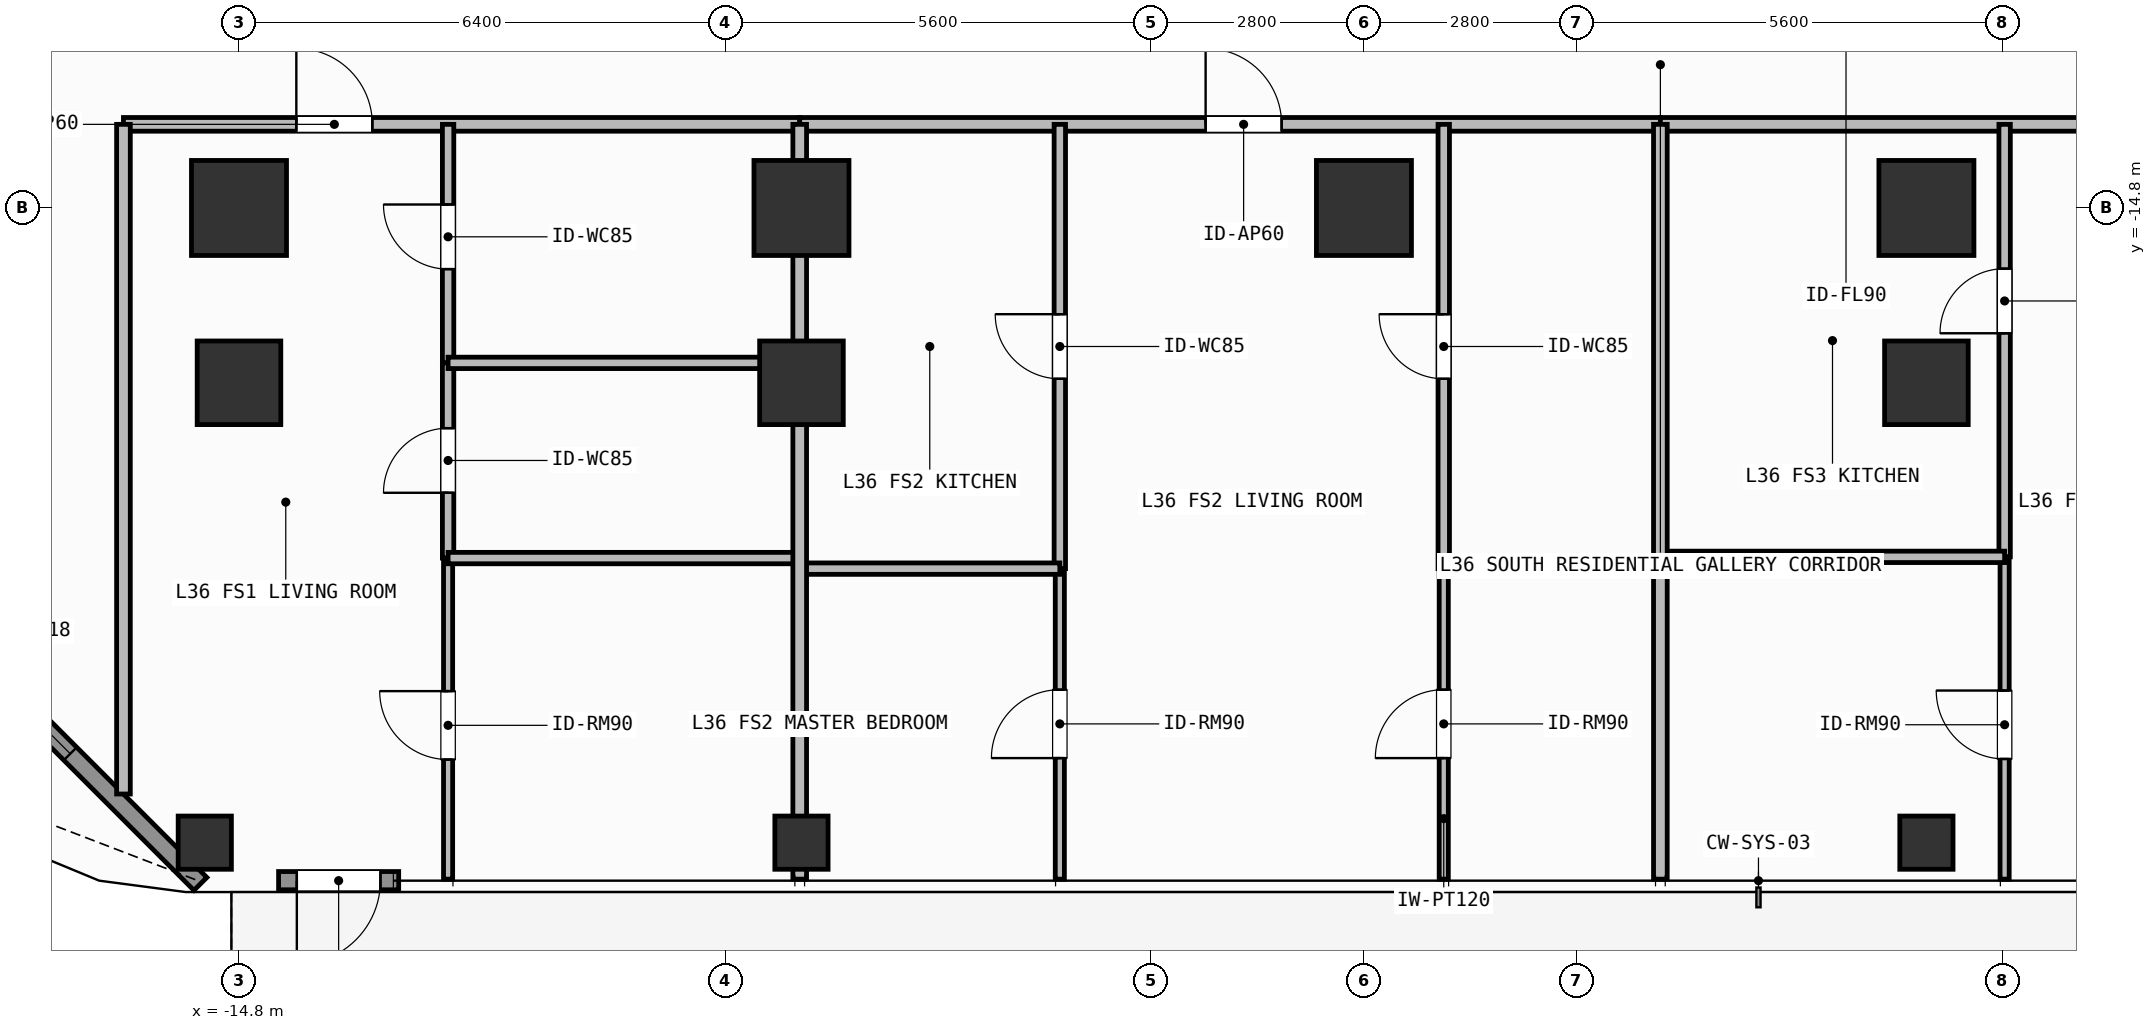
"""IFC4 building model, lengths in metres.
Left out: names, types, materials, properties, quantities, classifications, styles, units other than length and angle.
Written with IfcOpenShell. Run it as: python <this file> out.ifc"""

import sys

from ifc_helpers import new_model, si_unit, direction, frame, frame_2d, origin, origin_2d, place, context, subcontext, project, spatial, rectangle, hollow_rectangle, extrude, element, fill, save


model = new_model("IFC4")
c1 = context("Model", 3, precision=1e-05, world=origin(), true_north=direction((0.0, 1.0)))
c2 = subcontext(c1, "Body", "Model", "MODEL_VIEW")
j1 = project(units=[si_unit("LENGTHUNIT", "METRE"), si_unit("PLANEANGLEUNIT", "RADIAN")], contexts=[c1])
p1 = place(None, origin())
s1 = spatial("IfcSite", under=j1, at=p1, CompositionType="ELEMENT")
p2 = place(p1, origin())
s2 = spatial("IfcBuilding", under=s1, at=p2, CompositionType="ELEMENT")
p3 = place(p2, frame((0.0, 0.0, 144.6)))
s3 = spatial("IfcBuildingStorey", under=s2, at=p3, CompositionType="ELEMENT", Elevation=144.6)
for number, where, z_axis, x_axis in (
    (1, (-14.8, -14.8, 0.0), (0.0, 0.0, 1.0), (1.0, 0.0, 0.0)),
    (2, (-7.4, -14.8, 0.0), (0.0, 0.0, 1.0), (1.0, 0.0, 0.0)),
    (3, (0.0, -14.8, 0.0), (0.0, 0.0, 1.0), (1.0, 0.0, 0.0)),
    (4, (7.4, -14.8, 0.0), (0.0, 0.0, 1.0), (1.0, 0.0, 0.0)),
):
    element("IfcColumn", number, at=place(p3, frame(where, z_axis=z_axis, x_axis=x_axis)), inside=s3, PredefinedType="COLUMN", context=c2, shape_type="SweptSolid", body=[
        extrude(rectangle(XDim=1.25, YDim=1.25, at=origin_2d()), origin(), (0.0, 0.0, 1.0), 3.9),
    ])
for number, where, z_axis, x_axis in (
    (5, (-14.8, -17.1, 0.0), (0.0, 0.0, 1.0), (1.0, 0.0, 0.0)),
    (6, (-7.4, -17.1, 0.0), (0.0, 0.0, 1.0), (1.0, 0.0, 0.0)),
    (7, (7.4, -17.1, 0.0), (0.0, 0.0, 1.0), (1.0, 0.0, 0.0)),
):
    element("IfcColumn", number, at=place(p3, frame(where, z_axis=z_axis, x_axis=x_axis)), inside=s3, PredefinedType="COLUMN", context=c2, shape_type="SweptSolid", body=[
        extrude(rectangle(XDim=1.1, YDim=1.1, at=origin_2d()), origin(), (0.0, 0.0, 1.0), 3.9),
    ])
for number, where, z_axis, x_axis in (
    (8, (-15.25, -23.15, 0.0), (0.0, 0.0, 1.0), (1.0, 0.0, 0.0)),
    (9, (-7.4, -23.15, 0.0), (0.0, 0.0, 1.0), (1.0, 0.0, 0.0)),
    (10, (7.4, -23.15, 0.0), (0.0, 0.0, 1.0), (1.0, 0.0, 0.0)),
):
    element("IfcColumn", number, at=place(p3, frame(where, z_axis=z_axis, x_axis=x_axis)), inside=s3, PredefinedType="COLUMN", context=c2, shape_type="SweptSolid", body=[
        extrude(hollow_rectangle(XDim=0.7, YDim=0.7, WallThickness=0.032, at=origin_2d()), origin(), (0.0, 0.0, 1.0), 3.9),
    ])
p4 = place(p3, frame((-12.699, -23.65, 0.0), z_axis=(0.0, 0.0, 1.0), x_axis=(-1.0, 0.0, 0.0)))
e11 = element("IfcWall", 11, at=p4, inside=s3, PredefinedType="SOLIDWALL", context=c2, shape_type="SweptSolid", body=[
    extrude(rectangle(XDim=1.58, YDim=0.24, at=frame_2d((0.79, 0.0))), origin(), (0.0, 0.0, 1.0), 3.68),
])
p5 = place(p4, frame((0.24, 0.0, 0.0)))
e12 = element("IfcOpeningElement", 12, at=p5, cuts=e11, PredefinedType="OPENING", context=c2, shape_type="SweptSolid", body=[
    extrude(rectangle(XDim=1.1, YDim=2.2, at=frame_2d((0.55, 1.1))), frame((0.0, 0.13, 0.0), z_axis=(0.0, -1.0, 0.0), x_axis=(1.0, 0.0, 0.0)), (0.0, 0.0, 1.0), 0.26),
])
p6 = place(p3, frame((-15.308, -23.692, 0.0), z_axis=(0.0, 0.0, 1.0), x_axis=(-0.707106781187, 0.707106781187, 0.0)))
e13 = element("IfcWall", 13, at=p6, inside=s3, PredefinedType="SOLIDWALL", context=c2, shape_type="SweptSolid", body=[
    extrude(rectangle(XDim=6.343, YDim=0.24, at=frame_2d((3.171, 0.0))), origin(), (0.0, 0.0, 1.0), 3.68),
])
p7 = place(p6, frame((2.421, 0.0, 0.8)))
e14 = element("IfcOpeningElement", 14, at=p7, cuts=e13, PredefinedType="OPENING", context=c2, shape_type="SweptSolid", body=[
    extrude(rectangle(XDim=1.5, YDim=1.85, at=frame_2d((0.75, 0.925))), frame((0.0, 0.13, 0.0), z_axis=(0.0, -1.0, 0.0), x_axis=(1.0, 0.0, 0.0)), (0.0, 0.0, 1.0), 0.26),
])
p8 = place(p3, frame((-16.32, -13.7, 0.0), z_axis=(0.0, 0.0, 1.0), x_axis=(1.0, 0.0, 0.0)))
e15 = element("IfcWall", 15, at=p8, inside=s3, PredefinedType="PARTITIONING", context=c2, shape_type="SweptSolid", body=[
    extrude(rectangle(XDim=8.897, YDim=0.18, at=frame_2d((4.448, 0.0))), origin(), (0.0, 0.0, 1.0), 3.68),
])
p9 = place(p8, frame((2.274, 0.0, 0.0)))
e16 = element("IfcOpeningElement", 16, at=p9, cuts=e15, PredefinedType="OPENING", context=c2, shape_type="SweptSolid", body=[
    extrude(rectangle(XDim=1.0, YDim=2.2, at=frame_2d((0.5, 1.1))), frame((0.0, 0.1, 0.0), z_axis=(0.0, -1.0, 0.0), x_axis=(1.0, 0.0, 0.0)), (0.0, 0.0, 1.0), 0.2),
])
p10 = place(p3, frame((-12.049, -16.838, 0.0), z_axis=(0.0, 0.0, 1.0), x_axis=(0.0, 1.0, 0.0)))
e17 = element("IfcWall", 17, at=p10, inside=s3, PredefinedType="PARTITIONING", context=c2, shape_type="SweptSolid", body=[
    extrude(rectangle(XDim=3.138, YDim=0.15, at=frame_2d((1.569, 0.0))), origin(), (0.0, 0.0, 1.0), 3.68),
])
p11 = place(p10, frame((1.233, 0.0, 0.0)))
e18 = element("IfcOpeningElement", 18, at=p11, cuts=e17, PredefinedType="OPENING", context=c2, shape_type="SweptSolid", body=[
    extrude(rectangle(XDim=0.85, YDim=2.1, at=frame_2d((0.425, 1.05))), frame((0.0, 0.085, 0.0), z_axis=(0.0, -1.0, 0.0), x_axis=(1.0, 0.0, 0.0)), (0.0, 0.0, 1.0), 0.17),
])
p12 = place(p3, frame((-12.049, -19.406, 0.0), z_axis=(0.0, 0.0, 1.0), x_axis=(0.0, 1.0, 0.0)))
e19 = element("IfcWall", 19, at=p12, inside=s3, PredefinedType="PARTITIONING", context=c2, shape_type="SweptSolid", body=[
    extrude(rectangle(XDim=2.568, YDim=0.15, at=frame_2d((1.284, 0.0))), origin(), (0.0, 0.0, 1.0), 3.68),
])
p13 = place(p12, frame((0.859, 0.0, 0.0)))
e20 = element("IfcOpeningElement", 20, at=p13, cuts=e19, PredefinedType="OPENING", context=c2, shape_type="SweptSolid", body=[
    extrude(rectangle(XDim=0.85, YDim=2.1, at=frame_2d((0.425, 1.05))), frame((0.0, 0.085, 0.0), z_axis=(0.0, -1.0, 0.0), x_axis=(1.0, 0.0, 0.0)), (0.0, 0.0, 1.0), 0.17),
])
p14 = place(p3, frame((-12.049, -23.63, 0.0), z_axis=(0.0, 0.0, 1.0), x_axis=(0.0, 1.0, 0.0)))
e21 = element("IfcWall", 21, at=p14, inside=s3, PredefinedType="PARTITIONING", context=c2, shape_type="SweptSolid", body=[
    extrude(rectangle(XDim=4.224, YDim=0.12, at=frame_2d((2.112, 0.0))), origin(), (0.0, 0.0, 1.0), 3.68),
])
p15 = place(p14, frame((1.573, 0.0, 0.0)))
e22 = element("IfcOpeningElement", 22, at=p15, cuts=e21, PredefinedType="OPENING", context=c2, shape_type="SweptSolid", body=[
    extrude(rectangle(XDim=0.9, YDim=2.1, at=frame_2d((0.45, 1.05))), frame((0.0, 0.07, 0.0), z_axis=(0.0, -1.0, 0.0), x_axis=(1.0, 0.0, 0.0)), (0.0, 0.0, 1.0), 0.14),
])
p16 = place(p3, frame((-7.423, -13.7, 0.0), z_axis=(0.0, 0.0, 1.0), x_axis=(1.0, 0.0, 0.0)))
e23 = element("IfcWall", 23, at=p16, inside=s3, PredefinedType="PARTITIONING", context=c2, shape_type="SweptSolid", body=[
    extrude(rectangle(XDim=11.323, YDim=0.18, at=frame_2d((5.662, 0.0))), origin(), (0.0, 0.0, 1.0), 3.68),
])
p17 = place(p16, frame((5.34, 0.0, 0.0)))
e24 = element("IfcOpeningElement", 24, at=p17, cuts=e23, PredefinedType="OPENING", context=c2, shape_type="SweptSolid", body=[
    extrude(rectangle(XDim=1.0, YDim=2.2, at=frame_2d((0.5, 1.1))), frame((0.0, 0.1, 0.0), z_axis=(0.0, -1.0, 0.0), x_axis=(1.0, 0.0, 0.0)), (0.0, 0.0, 1.0), 0.2),
])
p18 = place(p3, frame((-4.001, -19.545, 0.0), z_axis=(0.0, 0.0, 1.0), x_axis=(0.0, 1.0, 0.0)))
e25 = element("IfcWall", 25, at=p18, inside=s3, PredefinedType="PARTITIONING", context=c2, shape_type="SweptSolid", body=[
    extrude(rectangle(XDim=5.845, YDim=0.15, at=frame_2d((2.922, 0.0))), origin(), (0.0, 0.0, 1.0), 3.68),
])
p19 = place(p18, frame((2.498, 0.0, 0.0)))
e26 = element("IfcOpeningElement", 26, at=p19, cuts=e25, PredefinedType="OPENING", context=c2, shape_type="SweptSolid", body=[
    extrude(rectangle(XDim=0.85, YDim=2.1, at=frame_2d((0.425, 1.05))), frame((0.0, 0.085, 0.0), z_axis=(0.0, -1.0, 0.0), x_axis=(1.0, 0.0, 0.0)), (0.0, 0.0, 1.0), 0.17),
])
p20 = place(p3, frame((-4.001, -23.63, 0.0), z_axis=(0.0, 0.0, 1.0), x_axis=(0.0, 1.0, 0.0)))
e27 = element("IfcWall", 27, at=p20, inside=s3, PredefinedType="PARTITIONING", context=c2, shape_type="SweptSolid", body=[
    extrude(rectangle(XDim=4.085, YDim=0.12, at=frame_2d((2.042, 0.0))), origin(), (0.0, 0.0, 1.0), 3.68),
])
p21 = place(p20, frame((1.593, 0.0, 0.0)))
e28 = element("IfcOpeningElement", 28, at=p21, cuts=e27, PredefinedType="OPENING", context=c2, shape_type="SweptSolid", body=[
    extrude(rectangle(XDim=0.9, YDim=2.1, at=frame_2d((0.45, 1.05))), frame((0.0, 0.07, 0.0), z_axis=(0.0, -1.0, 0.0), x_axis=(1.0, 0.0, 0.0)), (0.0, 0.0, 1.0), 0.14),
])
p22 = place(p3, frame((1.05, -19.545, 0.0), z_axis=(0.0, 0.0, 1.0), x_axis=(0.0, 1.0, 0.0)))
e29 = element("IfcWall", 29, at=p22, inside=s3, PredefinedType="PARTITIONING", context=c2, shape_type="SweptSolid", body=[
    extrude(rectangle(XDim=5.845, YDim=0.15, at=frame_2d((2.922, 0.0))), origin(), (0.0, 0.0, 1.0), 3.68),
])
p23 = place(p22, frame((2.498, 0.0, 0.0)))
e30 = element("IfcOpeningElement", 30, at=p23, cuts=e29, PredefinedType="OPENING", context=c2, shape_type="SweptSolid", body=[
    extrude(rectangle(XDim=0.85, YDim=2.1, at=frame_2d((0.425, 1.05))), frame((0.0, 0.085, 0.0), z_axis=(0.0, -1.0, 0.0), x_axis=(1.0, 0.0, 0.0)), (0.0, 0.0, 1.0), 0.17),
])
p24 = place(p3, frame((1.05, -23.63, 0.0), z_axis=(0.0, 0.0, 1.0), x_axis=(0.0, 1.0, 0.0)))
e31 = element("IfcWall", 31, at=p24, inside=s3, PredefinedType="PARTITIONING", context=c2, shape_type="SweptSolid", body=[
    extrude(rectangle(XDim=4.085, YDim=0.12, at=frame_2d((2.042, 0.0))), origin(), (0.0, 0.0, 1.0), 3.68),
])
p25 = place(p24, frame((1.593, 0.0, 0.0)))
e32 = element("IfcOpeningElement", 32, at=p25, cuts=e31, PredefinedType="OPENING", context=c2, shape_type="SweptSolid", body=[
    extrude(rectangle(XDim=0.9, YDim=2.1, at=frame_2d((0.45, 1.05))), frame((0.0, 0.07, 0.0), z_axis=(0.0, -1.0, 0.0), x_axis=(1.0, 0.0, 0.0)), (0.0, 0.0, 1.0), 0.14),
])
p26 = place(p3, frame((3.9, -13.7, 0.0), z_axis=(0.0, 0.0, 1.0), x_axis=(1.0, 0.0, 0.0)))
e33 = element("IfcWall", 33, at=p26, inside=s3, PredefinedType="PARTITIONING", context=c2, shape_type="SweptSolid", body=[
    extrude(rectangle(XDim=11.323, YDim=0.18, at=frame_2d((5.662, 0.0))), origin(), (0.0, 0.0, 1.0), 3.68),
])
p27 = place(p26, frame((5.519, 0.0, 0.0)))
e34 = element("IfcOpeningElement", 34, at=p27, cuts=e33, PredefinedType="OPENING", context=c2, shape_type="SweptSolid", body=[
    extrude(rectangle(XDim=1.0, YDim=2.2, at=frame_2d((0.5, 1.1))), frame((0.0, 0.1, 0.0), z_axis=(0.0, -1.0, 0.0), x_axis=(1.0, 0.0, 0.0)), (0.0, 0.0, 1.0), 0.2),
])
p28 = place(p3, frame((8.429, -19.39, 0.0), z_axis=(0.0, 0.0, 1.0), x_axis=(0.0, 1.0, 0.0)))
e35 = element("IfcWall", 35, at=p28, inside=s3, PredefinedType="PARTITIONING", context=c2, shape_type="SweptSolid", body=[
    extrude(rectangle(XDim=5.69, YDim=0.15, at=frame_2d((2.845, 0.0))), origin(), (0.0, 0.0, 1.0), 3.68),
])
p29 = place(p28, frame((2.941, 0.0, 0.0)))
e36 = element("IfcOpeningElement", 36, at=p29, cuts=e35, PredefinedType="OPENING", context=c2, shape_type="SweptSolid", body=[
    extrude(rectangle(XDim=0.85, YDim=2.1, at=frame_2d((0.425, 1.05))), frame((0.0, 0.085, 0.0), z_axis=(0.0, -1.0, 0.0), x_axis=(1.0, 0.0, 0.0)), (0.0, 0.0, 1.0), 0.17),
])
p30 = place(p3, frame((8.429, -23.63, 0.0), z_axis=(0.0, 0.0, 1.0), x_axis=(0.0, 1.0, 0.0)))
e37 = element("IfcWall", 37, at=p30, inside=s3, PredefinedType="PARTITIONING", context=c2, shape_type="SweptSolid", body=[
    extrude(rectangle(XDim=4.24, YDim=0.12, at=frame_2d((2.12, 0.0))), origin(), (0.0, 0.0, 1.0), 3.68),
])
p31 = place(p30, frame((1.581, 0.0, 0.0)))
e38 = element("IfcOpeningElement", 38, at=p31, cuts=e37, PredefinedType="OPENING", context=c2, shape_type="SweptSolid", body=[
    extrude(rectangle(XDim=0.9, YDim=2.1, at=frame_2d((0.45, 1.05))), frame((0.0, 0.07, 0.0), z_axis=(0.0, -1.0, 0.0), x_axis=(1.0, 0.0, 0.0)), (0.0, 0.0, 1.0), 0.14),
])
p32 = place(p3, frame((-16.32, -22.51, 0.0), z_axis=(0.0, 0.0, 1.0), x_axis=(0.0, 1.0, 0.0)))
e39 = element("IfcWall", 39, at=p32, inside=s3, PredefinedType="PARTITIONING", context=c2, shape_type="SweptSolid", body=[
    extrude(rectangle(XDim=8.81, YDim=0.18, at=frame_2d((4.405, 0.0))), origin(), (0.0, 0.0, 1.0), 3.68),
])
p33 = place(p3, frame((-12.049, -16.838, 0.0), z_axis=(0.0, 0.0, 1.0), x_axis=(1.0, 0.0, 0.0)))
e40 = element("IfcWall", 40, at=p33, inside=s3, PredefinedType="PARTITIONING", context=c2, shape_type="SweptSolid", body=[
    extrude(rectangle(XDim=4.626, YDim=0.15, at=frame_2d((2.313, 0.0))), origin(), (0.0, 0.0, 1.0), 3.082),
])
p34 = place(p3, frame((-12.049, -19.406, 0.0), z_axis=(0.0, 0.0, 1.0), x_axis=(1.0, 0.0, 0.0)))
e41 = element("IfcWall", 41, at=p34, inside=s3, PredefinedType="PARTITIONING", context=c2, shape_type="SweptSolid", body=[
    extrude(rectangle(XDim=4.626, YDim=0.15, at=frame_2d((2.313, 0.0))), origin(), (0.0, 0.0, 1.0), 3.68),
])
p35 = place(p3, frame((-7.423, -19.545, 0.0), z_axis=(0.0, 0.0, 1.0), x_axis=(1.0, 0.0, 0.0)))
e42 = element("IfcWall", 42, at=p35, inside=s3, PredefinedType="PARTITIONING", context=c2, shape_type="SweptSolid", body=[
    extrude(rectangle(XDim=3.422, YDim=0.15, at=frame_2d((1.711, 0.0))), origin(), (0.0, 0.0, 1.0), 3.68),
])
p36 = place(p3, frame((1.05, -19.545, 0.0), z_axis=(0.0, 0.0, 1.0), x_axis=(1.0, 0.0, 0.0)))
e43 = element("IfcWall", 43, at=p36, inside=s3, PredefinedType="PARTITIONING", context=c2, shape_type="SweptSolid", body=[
    extrude(rectangle(XDim=2.85, YDim=0.15, at=frame_2d((1.425, 0.0))), origin(), (0.0, 0.0, 1.0), 3.68),
])
p37 = place(p3, frame((-7.423, -23.63, 0.0), z_axis=(0.0, 0.0, 1.0), x_axis=(0.0, 1.0, 0.0)))
e44 = element("IfcWall", 44, at=p37, inside=s3, PredefinedType="PARTITIONING", context=c2, shape_type="SweptSolid", body=[
    extrude(rectangle(XDim=9.93, YDim=0.18, at=frame_2d((4.965, 0.0))), origin(), (0.0, 0.0, 1.0), 3.082),
])
p38 = place(p3, frame((3.9, -19.39, 0.0), z_axis=(0.0, 0.0, 1.0), x_axis=(1.0, 0.0, 0.0)))
e45 = element("IfcWall", 45, at=p38, inside=s3, PredefinedType="PARTITIONING", context=c2, shape_type="SweptSolid", body=[
    extrude(rectangle(XDim=4.529, YDim=0.15, at=frame_2d((2.265, 0.0))), origin(), (0.0, 0.0, 1.0), 3.68),
])
p39 = place(p3, frame((3.9, -23.63, 0.0), z_axis=(0.0, 0.0, 1.0), x_axis=(0.0, 1.0, 0.0)))
e46 = element("IfcWall", 46, at=p39, inside=s3, PredefinedType="PARTITIONING", context=c2, shape_type="SweptSolid", body=[
    extrude(rectangle(XDim=9.93, YDim=0.18, at=frame_2d((4.965, 0.0))), origin(), (0.0, 0.0, 1.0), 3.68),
])
p40 = place(p5, origin())
e47 = element("IfcDoor", 47, at=p40, inside=s3, OperationType="SINGLE_SWING_RIGHT", PredefinedType="DOOR", context=c2, shape_type="SweptSolid", body=[
    extrude(rectangle(XDim=1.1, YDim=2.2, at=frame_2d((0.55, 1.1))), frame((0.0, 0.025, 0.0), z_axis=(0.0, -1.0, 0.0), x_axis=(1.0, 0.0, 0.0)), (0.0, 0.0, 1.0), 0.05),
])
fill(e12, e47)
p41 = place(p7, origin())
e48 = element("IfcWindow", 48, at=p41, inside=s3, PartitioningType="SINGLE_PANEL", PredefinedType="WINDOW", context=c2, shape_type="SweptSolid", body=[
    extrude(rectangle(XDim=1.5, YDim=1.85, at=frame_2d((0.75, 0.925))), frame((0.0, 0.03, 0.0), z_axis=(0.0, -1.0, 0.0), x_axis=(1.0, 0.0, 0.0)), (0.0, 0.0, 1.0), 0.06),
])
fill(e14, e48)
p42 = place(p9, origin())
e49 = element("IfcDoor", 49, at=p42, inside=s3, OperationType="SINGLE_SWING_LEFT", PredefinedType="DOOR", context=c2, shape_type="SweptSolid", body=[
    extrude(rectangle(XDim=1.0, YDim=2.2, at=frame_2d((0.5, 1.1))), frame((0.0, 0.025, 0.0), z_axis=(0.0, -1.0, 0.0), x_axis=(1.0, 0.0, 0.0)), (0.0, 0.0, 1.0), 0.05),
])
fill(e16, e49)
p43 = place(p11, origin())
e50 = element("IfcDoor", 50, at=p43, inside=s3, OperationType="SINGLE_SWING_RIGHT", PredefinedType="DOOR", context=c2, shape_type="SweptSolid", body=[
    extrude(rectangle(XDim=0.85, YDim=2.1, at=frame_2d((0.425, 1.05))), frame((0.0, 0.025, 0.0), z_axis=(0.0, -1.0, 0.0), x_axis=(1.0, 0.0, 0.0)), (0.0, 0.0, 1.0), 0.05),
])
fill(e18, e50)
p44 = place(p13, origin())
e51 = element("IfcDoor", 51, at=p44, inside=s3, OperationType="SINGLE_SWING_LEFT", PredefinedType="DOOR", context=c2, shape_type="SweptSolid", body=[
    extrude(rectangle(XDim=0.85, YDim=2.1, at=frame_2d((0.425, 1.05))), frame((0.0, 0.025, 0.0), z_axis=(0.0, -1.0, 0.0), x_axis=(1.0, 0.0, 0.0)), (0.0, 0.0, 1.0), 0.05),
])
fill(e20, e51)
p45 = place(p15, origin())
e52 = element("IfcDoor", 52, at=p45, inside=s3, OperationType="SINGLE_SWING_RIGHT", PredefinedType="DOOR", context=c2, shape_type="SweptSolid", body=[
    extrude(rectangle(XDim=0.9, YDim=2.1, at=frame_2d((0.45, 1.05))), frame((0.0, 0.025, 0.0), z_axis=(0.0, -1.0, 0.0), x_axis=(1.0, 0.0, 0.0)), (0.0, 0.0, 1.0), 0.05),
])
fill(e22, e52)
p46 = place(p17, origin())
e53 = element("IfcDoor", 53, at=p46, inside=s3, OperationType="SINGLE_SWING_LEFT", PredefinedType="DOOR", context=c2, shape_type="SweptSolid", body=[
    extrude(rectangle(XDim=1.0, YDim=2.2, at=frame_2d((0.5, 1.1))), frame((0.0, 0.025, 0.0), z_axis=(0.0, -1.0, 0.0), x_axis=(1.0, 0.0, 0.0)), (0.0, 0.0, 1.0), 0.05),
])
fill(e24, e53)
p47 = place(p19, origin())
e54 = element("IfcDoor", 54, at=p47, inside=s3, OperationType="SINGLE_SWING_RIGHT", PredefinedType="DOOR", context=c2, shape_type="SweptSolid", body=[
    extrude(rectangle(XDim=0.85, YDim=2.1, at=frame_2d((0.425, 1.05))), frame((0.0, 0.025, 0.0), z_axis=(0.0, -1.0, 0.0), x_axis=(1.0, 0.0, 0.0)), (0.0, 0.0, 1.0), 0.05),
])
fill(e26, e54)
p48 = place(p21, origin())
e55 = element("IfcDoor", 55, at=p48, inside=s3, OperationType="SINGLE_SWING_LEFT", PredefinedType="DOOR", context=c2, shape_type="SweptSolid", body=[
    extrude(rectangle(XDim=0.9, YDim=2.1, at=frame_2d((0.45, 1.05))), frame((0.0, 0.025, 0.0), z_axis=(0.0, -1.0, 0.0), x_axis=(1.0, 0.0, 0.0)), (0.0, 0.0, 1.0), 0.05),
])
fill(e28, e55)
p49 = place(p23, origin())
e56 = element("IfcDoor", 56, at=p49, inside=s3, OperationType="SINGLE_SWING_RIGHT", PredefinedType="DOOR", context=c2, shape_type="SweptSolid", body=[
    extrude(rectangle(XDim=0.85, YDim=2.1, at=frame_2d((0.425, 1.05))), frame((0.0, 0.025, 0.0), z_axis=(0.0, -1.0, 0.0), x_axis=(1.0, 0.0, 0.0)), (0.0, 0.0, 1.0), 0.05),
])
fill(e30, e56)
p50 = place(p25, origin())
e57 = element("IfcDoor", 57, at=p50, inside=s3, OperationType="SINGLE_SWING_LEFT", PredefinedType="DOOR", context=c2, shape_type="SweptSolid", body=[
    extrude(rectangle(XDim=0.9, YDim=2.1, at=frame_2d((0.45, 1.05))), frame((0.0, 0.025, 0.0), z_axis=(0.0, -1.0, 0.0), x_axis=(1.0, 0.0, 0.0)), (0.0, 0.0, 1.0), 0.05),
])
fill(e32, e57)
p51 = place(p29, origin())
e58 = element("IfcDoor", 58, at=p51, inside=s3, OperationType="SINGLE_SWING_LEFT", PredefinedType="DOOR", context=c2, shape_type="SweptSolid", body=[
    extrude(rectangle(XDim=0.85, YDim=2.1, at=frame_2d((0.425, 1.05))), frame((0.0, 0.025, 0.0), z_axis=(0.0, -1.0, 0.0), x_axis=(1.0, 0.0, 0.0)), (0.0, 0.0, 1.0), 0.05),
])
fill(e36, e58)
p52 = place(p31, origin())
e59 = element("IfcDoor", 59, at=p52, inside=s3, OperationType="SINGLE_SWING_RIGHT", PredefinedType="DOOR", context=c2, shape_type="SweptSolid", body=[
    extrude(rectangle(XDim=0.9, YDim=2.1, at=frame_2d((0.45, 1.05))), frame((0.0, 0.025, 0.0), z_axis=(0.0, -1.0, 0.0), x_axis=(1.0, 0.0, 0.0)), (0.0, 0.0, 1.0), 0.05),
])
fill(e38, e59)
save(model, sys.argv[1])
